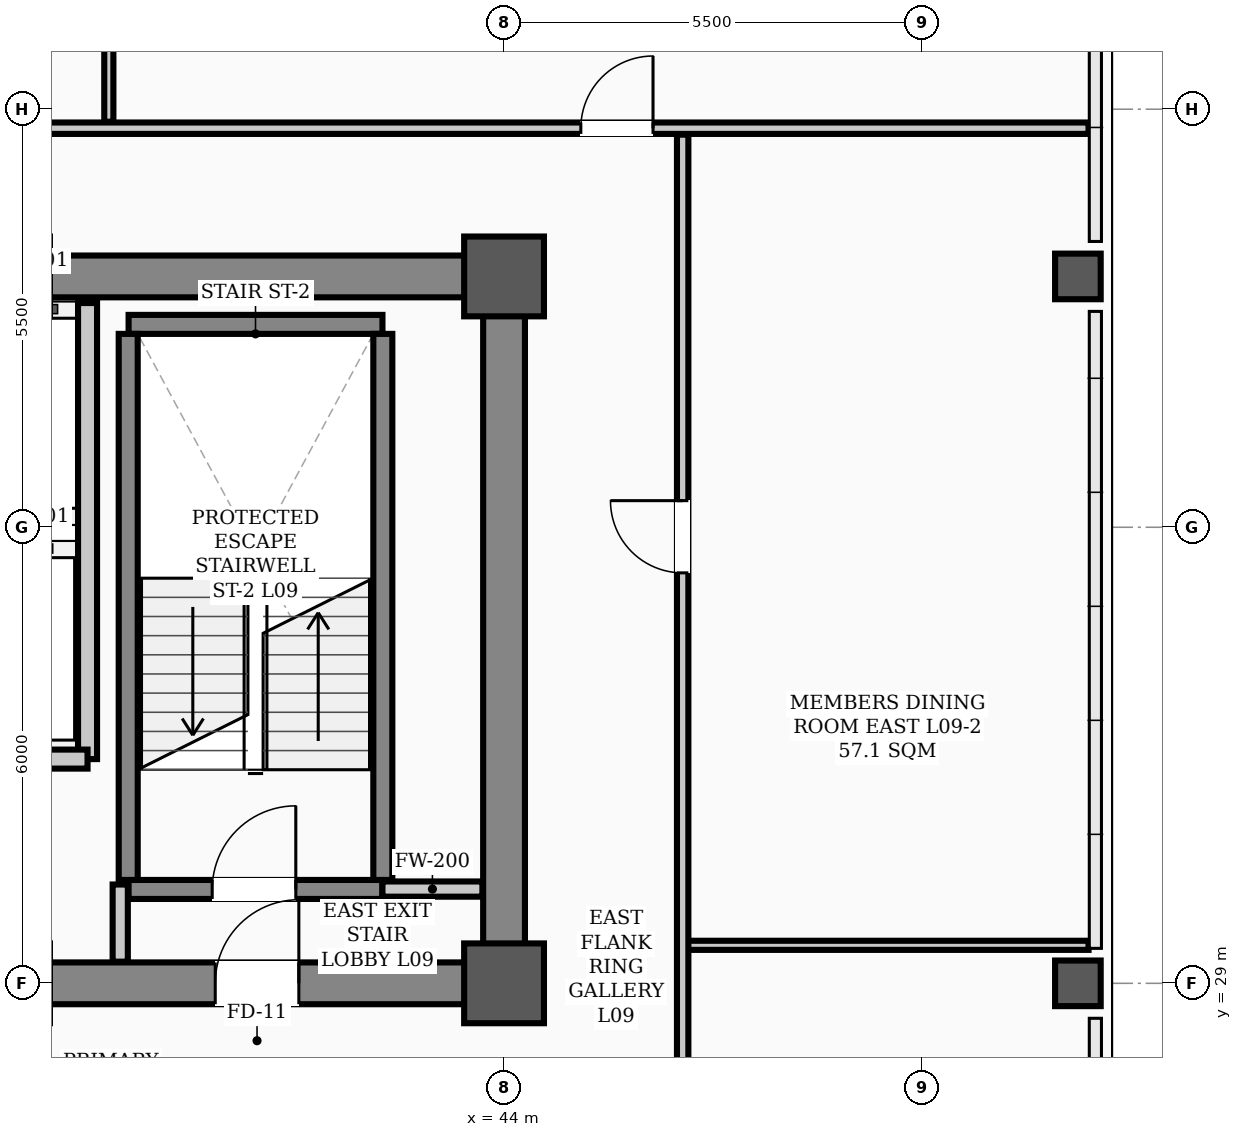
"""IFC4 building model, lengths in metres.
Left out: names, types, materials, properties, quantities, classifications, styles, units other than length and angle.
Written with IfcOpenShell. Run it as: python <this file> out.ifc"""

import sys

from ifc_helpers import new_model, si_unit, direction, frame, frame_2d, origin, origin_2d, place, context, subcontext, project, spatial, rectangle, hollow_rectangle, extrude, element, fill, save


model = new_model("IFC4")
c1 = context("Model", 3, precision=1e-05, world=origin(), true_north=direction((0.0, 1.0)))
c2 = subcontext(c1, "Body", "Model", "MODEL_VIEW")
j1 = project(units=[si_unit("LENGTHUNIT", "METRE"), si_unit("PLANEANGLEUNIT", "RADIAN")], contexts=[c1])
p1 = place(None, origin())
s1 = spatial("IfcSite", under=j1, at=p1, CompositionType="ELEMENT")
p2 = place(p1, origin())
s2 = spatial("IfcBuilding", under=s1, at=p2, CompositionType="ELEMENT")
p3 = place(p2, frame((0.0, 0.0, 38.2)))
s3 = spatial("IfcBuildingStorey", under=s2, at=p3, CompositionType="ELEMENT", Elevation=38.2)
for number, where, z_axis, x_axis in (
    (1, (44.0, 29.0, 0.0), (0.0, 0.0, 1.0), (1.0, 0.0, 0.0)),
    (2, (44.0, 38.3, 0.0), (0.0, 0.0, 1.0), (1.0, 0.0, 0.0)),
):
    element("IfcColumn", number, at=place(p3, frame(where, z_axis=z_axis, x_axis=x_axis)), inside=s3, PredefinedType="COLUMN", context=c2, shape_type="SweptSolid", body=[
        extrude(hollow_rectangle(XDim=1.05, YDim=1.05, WallThickness=0.038, InnerFilletRadius=0.019, OuterFilletRadius=0.057, at=origin_2d()), origin(), (0.0, 0.0, 1.0), 3.9),
    ])
for number, where, z_axis, x_axis in (
    (3, (51.55, 29.0, 0.0), (0.0, 0.0, 1.0), (1.0, 0.0, 0.0)),
    (4, (51.55, 38.3, 0.0), (0.0, 0.0, 1.0), (1.0, 0.0, 0.0)),
):
    element("IfcColumn", number, at=place(p3, frame(where, z_axis=z_axis, x_axis=x_axis)), inside=s3, PredefinedType="COLUMN", context=c2, shape_type="SweptSolid", body=[
        extrude(hollow_rectangle(XDim=0.6, YDim=0.6, WallThickness=0.026, InnerFilletRadius=0.013, OuterFilletRadius=0.039, at=origin_2d()), origin(), (0.0, 0.0, 1.0), 3.9),
    ])
p4 = place(p3, frame((13.5, 29.0, 0.0), z_axis=(0.0, 0.0, 1.0), x_axis=(1.0, 0.0, 0.0)))
e5 = element("IfcWall", 5, at=p4, inside=s3, PredefinedType="SHEAR", context=c2, shape_type="SweptSolid", body=[
    extrude(rectangle(XDim=30.5, YDim=0.55, at=frame_2d((15.25, 0.0))), origin(), (0.0, 0.0, 1.0), 3.72),
])
p5 = place(p4, frame((1.75, 0.0, 0.0)))
e6 = element("IfcOpeningElement", 6, at=p5, cuts=e5, PredefinedType="OPENING", context=c2, shape_type="SweptSolid", body=[
    extrude(rectangle(XDim=1.1, YDim=2.08, at=frame_2d((0.55, 1.04))), frame((0.0, 0.285, 0.0), z_axis=(0.0, -1.0, 0.0), x_axis=(1.0, 0.0, 0.0)), (0.0, 0.0, 1.0), 0.57),
])
p6 = place(p4, frame((26.7, 0.0, 0.0)))
e7 = element("IfcOpeningElement", 7, at=p6, cuts=e5, PredefinedType="OPENING", context=c2, shape_type="SweptSolid", body=[
    extrude(rectangle(XDim=1.1, YDim=2.08, at=frame_2d((0.55, 1.04))), frame((0.0, 0.285, 0.0), z_axis=(0.0, -1.0, 0.0), x_axis=(1.0, 0.0, 0.0)), (0.0, 0.0, 1.0), 0.57),
])
p7 = place(p4, frame((6.8, 0.0, 0.0)))
e8 = element("IfcOpeningElement", 8, at=p7, cuts=e5, PredefinedType="OPENING", context=c2, shape_type="SweptSolid", body=[
    extrude(rectangle(XDim=1.1, YDim=2.08, at=frame_2d((0.55, 1.04))), frame((0.0, 0.285, 0.0), z_axis=(0.0, -1.0, 0.0), x_axis=(1.0, 0.0, 0.0)), (0.0, 0.0, 1.0), 0.57),
])
p8 = place(p4, frame((13.2, 0.0, 0.0)))
e9 = element("IfcOpeningElement", 9, at=p8, cuts=e5, PredefinedType="OPENING", context=c2, shape_type="SweptSolid", body=[
    extrude(rectangle(XDim=1.6, YDim=2.08, at=frame_2d((0.8, 1.04))), frame((0.0, 0.285, 0.0), z_axis=(0.0, -1.0, 0.0), x_axis=(1.0, 0.0, 0.0)), (0.0, 0.0, 1.0), 0.57),
])
p9 = place(p4, frame((19.5, 0.0, 0.0)))
e10 = element("IfcOpeningElement", 10, at=p9, cuts=e5, PredefinedType="OPENING", context=c2, shape_type="SweptSolid", body=[
    extrude(rectangle(XDim=0.9, YDim=2.08, at=frame_2d((0.45, 1.04))), frame((0.0, 0.285, 0.0), z_axis=(0.0, -1.0, 0.0), x_axis=(1.0, 0.0, 0.0)), (0.0, 0.0, 1.0), 0.57),
])
p10 = place(p4, frame((21.55, 0.0, 0.0)))
e11 = element("IfcOpeningElement", 11, at=p10, cuts=e5, PredefinedType="OPENING", context=c2, shape_type="SweptSolid", body=[
    extrude(rectangle(XDim=0.9, YDim=2.08, at=frame_2d((0.45, 1.04))), frame((0.0, 0.285, 0.0), z_axis=(0.0, -1.0, 0.0), x_axis=(1.0, 0.0, 0.0)), (0.0, 0.0, 1.0), 0.57),
])
p11 = place(p3, frame((13.5, 38.3, 0.0), z_axis=(0.0, 0.0, 1.0), x_axis=(1.0, 0.0, 0.0)))
e12 = element("IfcWall", 12, at=p11, inside=s3, PredefinedType="SHEAR", context=c2, shape_type="SweptSolid", body=[
    extrude(rectangle(XDim=30.5, YDim=0.55, at=frame_2d((15.25, 0.0))), origin(), (0.0, 0.0, 1.0), 3.72),
])
p12 = place(p3, frame((44.0, 29.35, 0.0), z_axis=(0.0, 0.0, 1.0), x_axis=(0.0, 1.0, 0.0)))
e13 = element("IfcWall", 13, at=p12, inside=s3, PredefinedType="SHEAR", context=c2, shape_type="SweptSolid", body=[
    extrude(rectangle(XDim=8.6, YDim=0.55, at=frame_2d((4.3, 0.0))), origin(), (0.0, 0.0, 1.0), 3.72),
])
p13 = place(p3, frame((39.06, 30.235, 0.0), z_axis=(0.0, 0.0, 1.0), x_axis=(1.0, 0.0, 0.0)))
e14 = element("IfcWall", 14, at=p13, inside=s3, PredefinedType="STANDARD", context=c2, shape_type="SweptSolid", body=[
    extrude(rectangle(XDim=3.34, YDim=0.25, at=frame_2d((1.67, 0.0))), origin(), (0.0, 0.0, 1.0), 3.72),
])
p14 = place(p13, frame((1.1, 0.0, 0.0)))
e15 = element("IfcOpeningElement", 15, at=p14, cuts=e14, PredefinedType="OPENING", context=c2, shape_type="SweptSolid", body=[
    extrude(rectangle(XDim=1.1, YDim=2.08, at=frame_2d((0.55, 1.04))), frame((0.0, 0.135, 0.0), z_axis=(0.0, -1.0, 0.0), x_axis=(1.0, 0.0, 0.0)), (0.0, 0.0, 1.0), 0.27),
])
p15 = place(p3, frame((39.06, 37.669, 0.0), z_axis=(0.0, 0.0, 1.0), x_axis=(1.0, 0.0, 0.0)))
e16 = element("IfcWall", 16, at=p15, inside=s3, PredefinedType="STANDARD", context=c2, shape_type="SweptSolid", body=[
    extrude(rectangle(XDim=3.34, YDim=0.25, at=frame_2d((1.67, 0.0))), origin(), (0.0, 0.0, 1.0), 3.72),
])
for number, where, z_axis, x_axis in (
    (17, (39.055, 30.36, 0.0), (0.0, 0.0, 1.0), (0.0, 1.0, 0.0)),
    (18, (42.405, 30.36, 0.0), (0.0, 0.0, 1.0), (0.0, 1.0, 0.0)),
):
    element("IfcWall", number, at=place(p3, frame(where, z_axis=z_axis, x_axis=x_axis)), inside=s3, PredefinedType="STANDARD", context=c2, shape_type="SweptSolid", body=[
        extrude(rectangle(XDim=7.184, YDim=0.25, at=frame_2d((3.592, 0.0))), origin(), (0.0, 0.0, 1.0), 3.72),
    ])
p16 = place(p3, frame((38.52, 31.95, 0.0), z_axis=(0.0, 0.0, 1.0), x_axis=(0.0, 1.0, 0.0)))
e19 = element("IfcWall", 19, at=p16, inside=s3, PredefinedType="STANDARD", context=c2, shape_type="SweptSolid", body=[
    extrude(rectangle(XDim=6.0, YDim=0.25, at=frame_2d((3.0, 0.0))), origin(), (0.0, 0.0, 1.0), 3.3),
])
p17 = place(p3, frame((36.62, 31.95, 0.0), z_axis=(0.0, 0.0, 1.0), x_axis=(1.0, 0.0, 0.0)))
e20 = element("IfcWall", 20, at=p17, inside=s3, PredefinedType="STANDARD", context=c2, shape_type="SweptSolid", body=[
    extrude(rectangle(XDim=1.9, YDim=0.25, at=frame_2d((0.95, 0.0))), origin(), (0.0, 0.0, 1.0), 3.48),
])
p18 = place(p3, frame((42.4, 30.24, 0.0), z_axis=(0.0, 0.0, 1.0), x_axis=(1.0, 0.0, 0.0)))
e21 = element("IfcWall", 21, at=p18, inside=s3, PredefinedType="STANDARD", context=c2, shape_type="SweptSolid", body=[
    extrude(rectangle(XDim=1.315, YDim=0.2, at=frame_2d((0.658, 0.0))), origin(), (0.0, 0.0, 1.0), 3.1),
])
p19 = place(p3, frame((46.35, 29.5, 0.0), z_axis=(0.0, 0.0, 1.0), x_axis=(1.0, 0.0, 0.0)))
e22 = element("IfcWall", 22, at=p19, inside=s3, PredefinedType="PARTITIONING", context=c2, shape_type="SweptSolid", body=[
    extrude(rectangle(XDim=5.34, YDim=0.12, at=frame_2d((2.67, 0.0))), origin(), (0.0, 0.0, 1.0), 3.0),
])
p20 = place(p3, frame((2.31, 40.25, 0.0), z_axis=(0.0, 0.0, 1.0), x_axis=(1.0, 0.0, 0.0)))
e23 = element("IfcWall", 23, at=p20, inside=s3, PredefinedType="PARTITIONING", context=c2, shape_type="SweptSolid", body=[
    extrude(rectangle(XDim=49.38, YDim=0.15, at=frame_2d((24.69, 0.0))), origin(), (0.0, 0.0, 1.0), 3.1),
])
p21 = place(p20, frame((9.23, 0.0, 0.0)))
e24 = element("IfcOpeningElement", 24, at=p21, cuts=e23, PredefinedType="OPENING", context=c2, shape_type="SweptSolid", body=[
    extrude(rectangle(XDim=0.95, YDim=2.08, at=frame_2d((0.475, 1.04))), frame((0.0, 0.085, 0.0), z_axis=(0.0, -1.0, 0.0), x_axis=(1.0, 0.0, 0.0)), (0.0, 0.0, 1.0), 0.17),
])
p22 = place(p20, frame((23.115, 0.0, 0.0)))
e25 = element("IfcOpeningElement", 25, at=p22, cuts=e23, PredefinedType="OPENING", context=c2, shape_type="SweptSolid", body=[
    extrude(rectangle(XDim=0.95, YDim=2.08, at=frame_2d((0.475, 1.04))), frame((0.0, 0.085, 0.0), z_axis=(0.0, -1.0, 0.0), x_axis=(1.0, 0.0, 0.0)), (0.0, 0.0, 1.0), 0.17),
])
p23 = place(p20, frame((31.515, 0.0, 0.0)))
e26 = element("IfcOpeningElement", 26, at=p23, cuts=e23, PredefinedType="OPENING", context=c2, shape_type="SweptSolid", body=[
    extrude(rectangle(XDim=0.95, YDim=2.08, at=frame_2d((0.475, 1.04))), frame((0.0, 0.085, 0.0), z_axis=(0.0, -1.0, 0.0), x_axis=(1.0, 0.0, 0.0)), (0.0, 0.0, 1.0), 0.17),
])
p24 = place(p20, frame((42.7, 0.0, 0.0)))
e27 = element("IfcOpeningElement", 27, at=p24, cuts=e23, PredefinedType="OPENING", context=c2, shape_type="SweptSolid", body=[
    extrude(rectangle(XDim=0.95, YDim=2.08, at=frame_2d((0.475, 1.04))), frame((0.0, 0.085, 0.0), z_axis=(0.0, -1.0, 0.0), x_axis=(1.0, 0.0, 0.0)), (0.0, 0.0, 1.0), 0.17),
])
p25 = place(p3, frame((38.95, 29.285, 0.0), z_axis=(0.0, 0.0, 1.0), x_axis=(0.0, 1.0, 0.0)))
e28 = element("IfcWall", 28, at=p25, inside=s3, PredefinedType="STANDARD", context=c2, shape_type="SweptSolid", body=[
    extrude(rectangle(XDim=1.015, YDim=0.2, at=frame_2d((0.508, 0.0))), origin(), (0.0, 0.0, 1.0), 3.3),
])
p26 = place(p3, frame((46.35, 17.635, 0.0), z_axis=(0.0, 0.0, 1.0), x_axis=(0.0, 1.0, 0.0)))
e29 = element("IfcWall", 29, at=p26, inside=s3, PredefinedType="PARTITIONING", context=c2, shape_type="SweptSolid", body=[
    extrude(rectangle(XDim=22.53, YDim=0.15, at=frame_2d((11.265, 0.0))), origin(), (0.0, 0.0, 1.0), 3.0),
])
p27 = place(p26, frame((5.415, 0.0, 0.0)))
e30 = element("IfcOpeningElement", 30, at=p27, cuts=e29, PredefinedType="OPENING", context=c2, shape_type="SweptSolid", body=[
    extrude(rectangle(XDim=0.95, YDim=2.08, at=frame_2d((0.475, 1.04))), frame((0.0, 0.085, 0.0), z_axis=(0.0, -1.0, 0.0), x_axis=(1.0, 0.0, 0.0)), (0.0, 0.0, 1.0), 0.17),
])
p28 = place(p26, frame((16.765, 0.0, 0.0)))
e31 = element("IfcOpeningElement", 31, at=p28, cuts=e29, PredefinedType="OPENING", context=c2, shape_type="SweptSolid", body=[
    extrude(rectangle(XDim=0.95, YDim=2.08, at=frame_2d((0.475, 1.04))), frame((0.0, 0.085, 0.0), z_axis=(0.0, -1.0, 0.0), x_axis=(1.0, 0.0, 0.0)), (0.0, 0.0, 1.0), 0.17),
])
p29 = place(p3, frame((38.8, 40.335, 0.0), z_axis=(0.0, 0.0, 1.0), x_axis=(0.0, 1.0, 0.0)))
e32 = element("IfcWall", 32, at=p29, inside=s3, PredefinedType="PARTITIONING", context=c2, shape_type="SweptSolid", body=[
    extrude(rectangle(XDim=6.355, YDim=0.12, at=frame_2d((3.177, 0.0))), origin(), (0.0, 0.0, 1.0), 3.212),
])
p30 = place(p14, origin())
e33 = element("IfcDoor", 33, at=p30, inside=s3, OperationType="SINGLE_SWING_RIGHT", PredefinedType="DOOR", context=c2, shape_type="SweptSolid", body=[
    extrude(rectangle(XDim=1.1, YDim=2.08, at=frame_2d((0.55, 1.04))), frame((0.0, 0.025, 0.0), z_axis=(0.0, -1.0, 0.0), x_axis=(1.0, 0.0, 0.0)), (0.0, 0.0, 1.0), 0.05),
])
fill(e15, e33)
p31 = place(p6, origin())
e34 = element("IfcDoor", 34, at=p31, inside=s3, OperationType="SINGLE_SWING_RIGHT", PredefinedType="DOOR", context=c2, shape_type="SweptSolid", body=[
    extrude(rectangle(XDim=1.1, YDim=2.08, at=frame_2d((0.55, 1.04))), frame((0.0, 0.025, 0.0), z_axis=(0.0, -1.0, 0.0), x_axis=(1.0, 0.0, 0.0)), (0.0, 0.0, 1.0), 0.05),
])
fill(e7, e34)
p32 = place(p28, origin())
e35 = element("IfcDoor", 35, at=p32, inside=s3, OperationType="SINGLE_SWING_RIGHT", PredefinedType="DOOR", context=c2, shape_type="SweptSolid", body=[
    extrude(rectangle(XDim=0.95, YDim=2.08, at=frame_2d((0.475, 1.04))), frame((0.0, 0.025, 0.0), z_axis=(0.0, -1.0, 0.0), x_axis=(1.0, 0.0, 0.0)), (0.0, 0.0, 1.0), 0.05),
])
fill(e31, e35)
p33 = place(p24, origin())
e36 = element("IfcDoor", 36, at=p33, inside=s3, OperationType="SINGLE_SWING_RIGHT", PredefinedType="DOOR", context=c2, shape_type="SweptSolid", body=[
    extrude(rectangle(XDim=0.95, YDim=2.08, at=frame_2d((0.475, 1.04))), frame((0.0, 0.025, 0.0), z_axis=(0.0, -1.0, 0.0), x_axis=(1.0, 0.0, 0.0)), (0.0, 0.0, 1.0), 0.05),
])
fill(e27, e36)
save(model, sys.argv[1])
